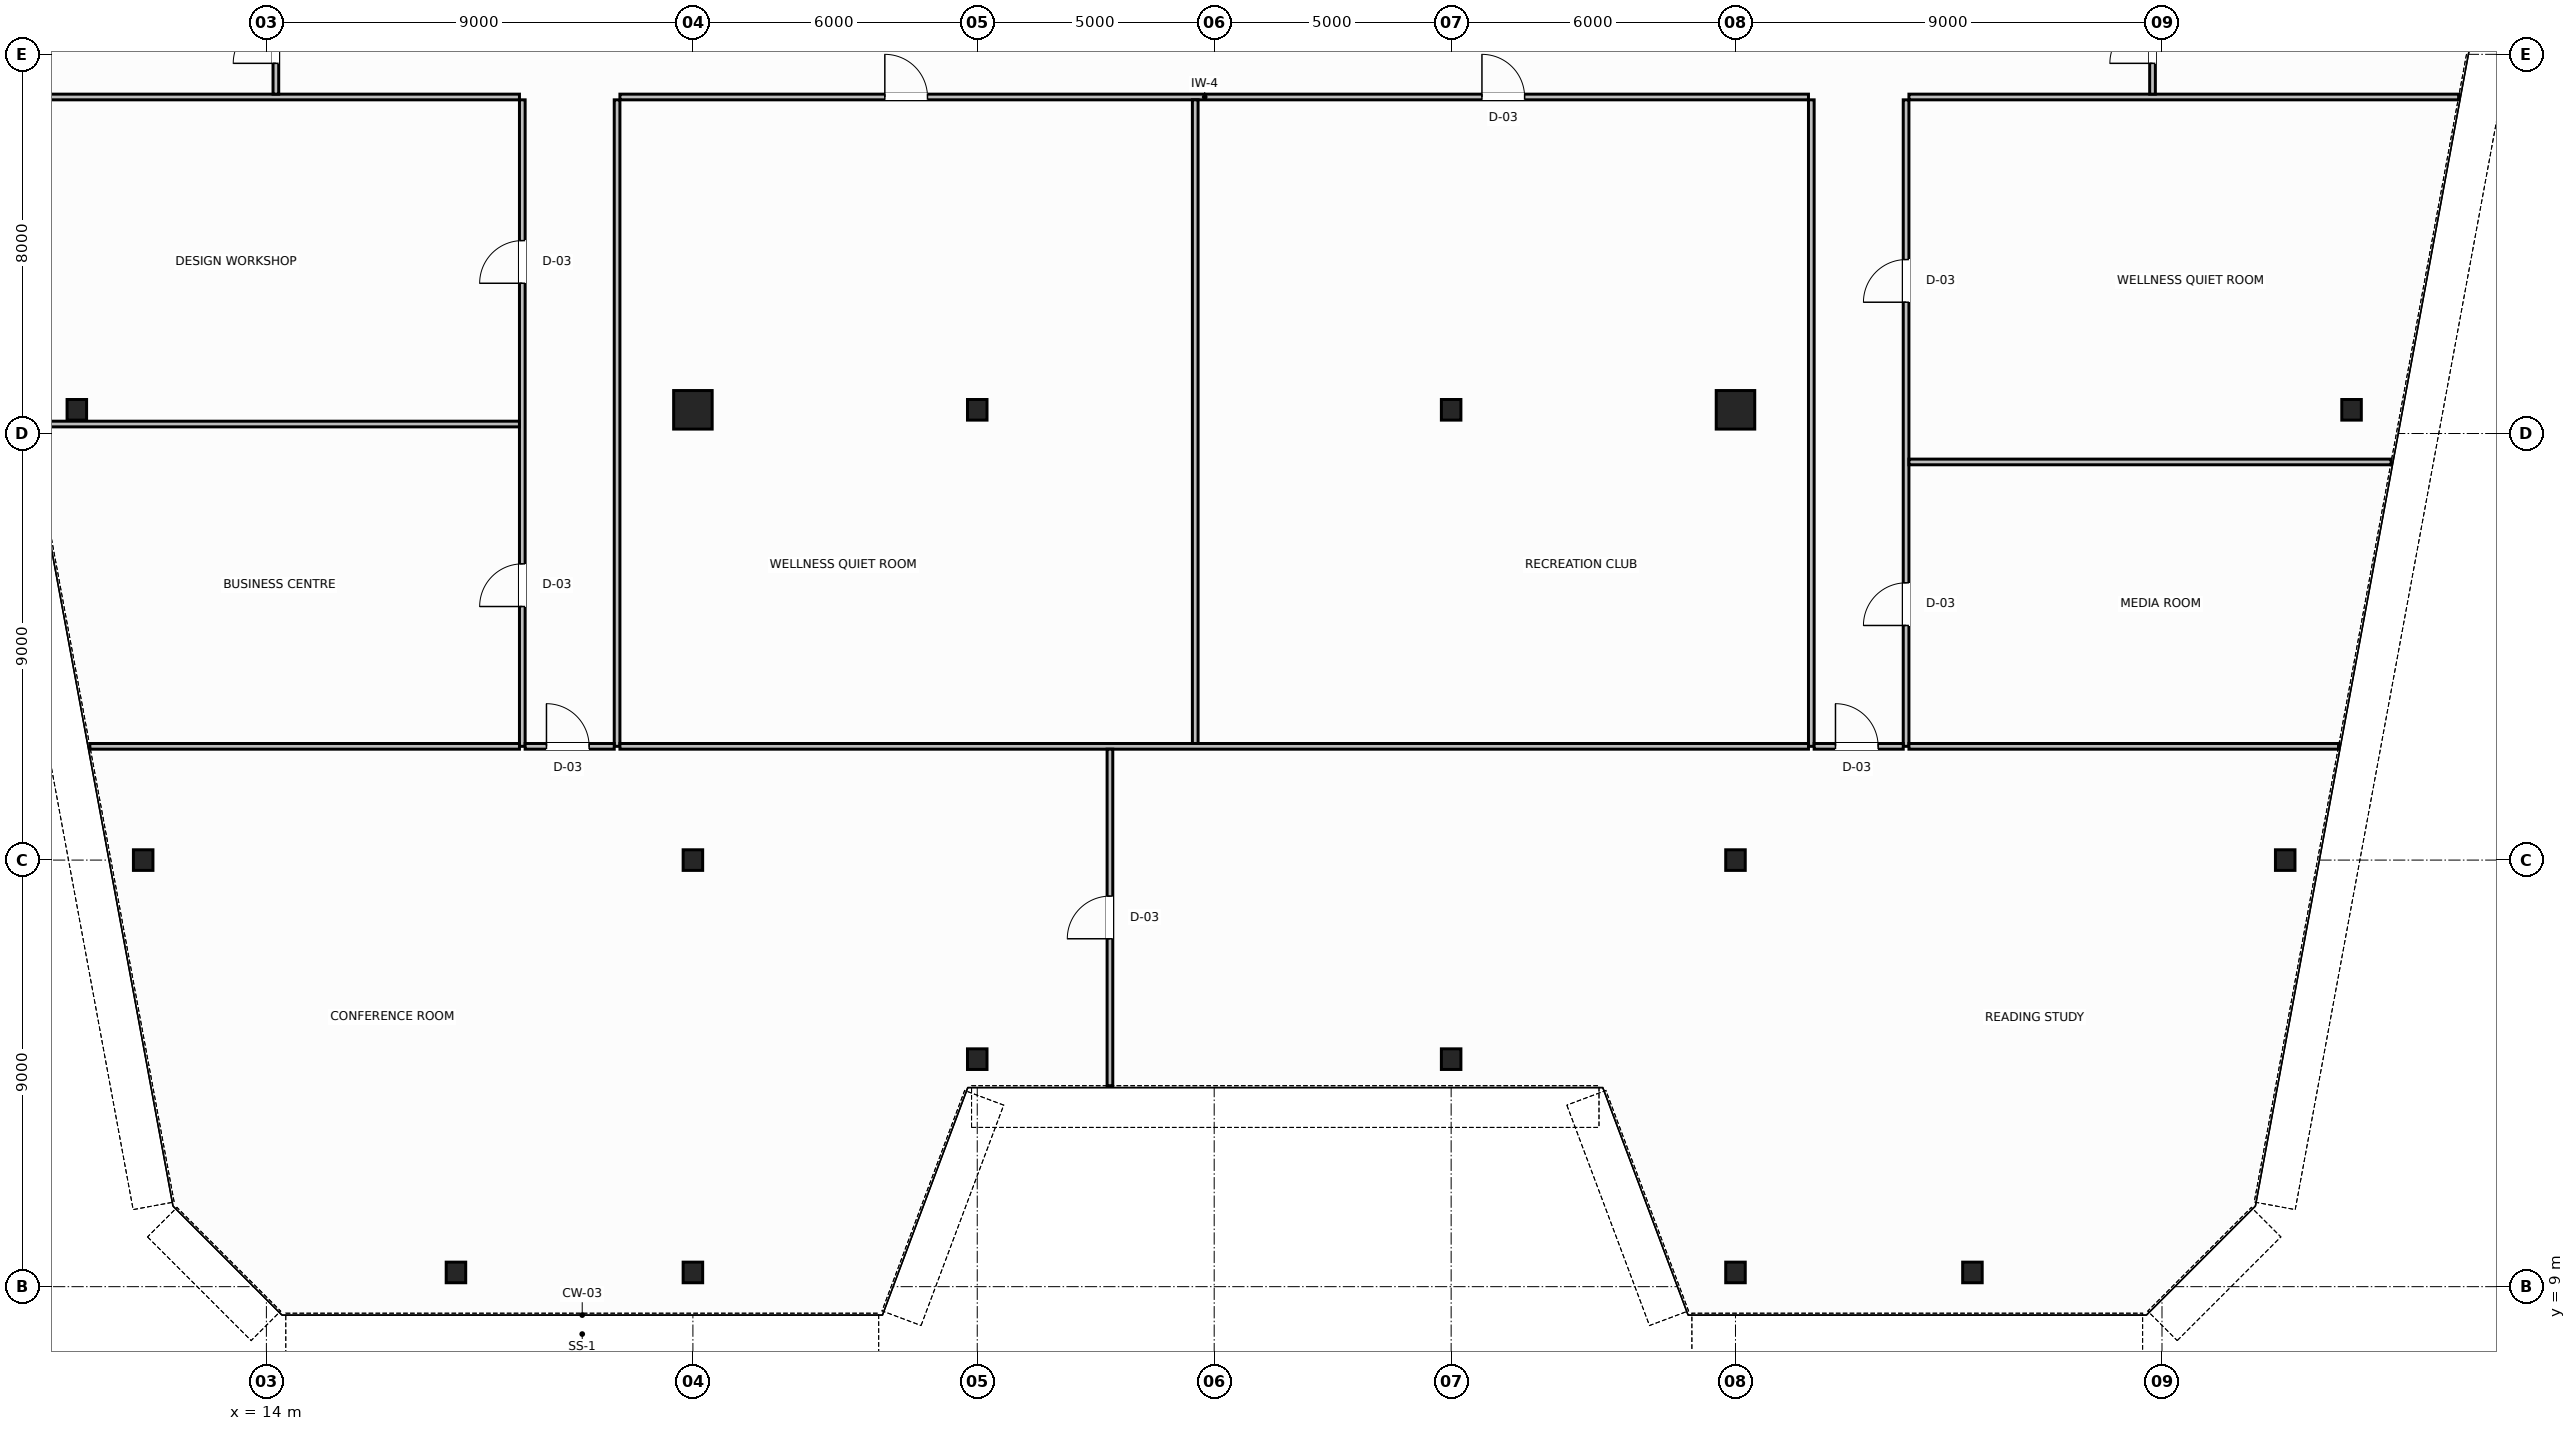
"""IFC4 building model, lengths in metres.
Left out: names, types, materials, properties, quantities, classifications, styles, units other than length and angle.
Written with IfcOpenShell. Run it as: python <this file> out.ifc"""

import sys

from ifc_helpers import new_model, si_unit, direction, frame, frame_2d, origin, origin_2d, place, context, subcontext, project, spatial, rectangle, hollow_circle, i_section, extrude, source, transform, mapped, element, fill, save


model = new_model("IFC4")
c1 = context("Model", 3, precision=1e-05, world=origin(), true_north=direction((0.0, 1.0)))
c2 = subcontext(c1, "Body", "Model", "MODEL_VIEW")
j1 = project(units=[si_unit("LENGTHUNIT", "METRE"), si_unit("PLANEANGLEUNIT", "RADIAN")], contexts=[c1])
p1 = place(None, origin())
s1 = spatial("IfcSite", under=j1, at=p1, CompositionType="ELEMENT")
p2 = place(p1, origin())
s2 = spatial("IfcBuilding", under=s1, at=p2, CompositionType="ELEMENT")
p3 = place(p2, frame((0.0, 0.0, 210.8)))
s3 = spatial("IfcBuildingStorey", under=s2, at=p3, CompositionType="ELEMENT", Elevation=210.8)
m1 = source(origin(), c2, "Body", "SweptSolid", [
    extrude(i_section(OverallWidth=0.412, OverallDepth=0.435, WebThickness=0.036, FlangeThickness=0.05, FilletRadius=0.015, at=origin_2d()), origin(), (0.0, 0.0, 1.0), 3.8),
])
for number, where, z_axis, x_axis in (
    (1, (10.0, 27.5, 0.0), (0.0, 0.0, 1.0), (1.0, 0.0, 0.0)),
    (2, (11.4, 18.0, 0.0), (0.0, 0.0, 1.0), (1.0, 0.0, 0.0)),
    (3, (58.0, 27.5, 0.0), (0.0, 0.0, 1.0), (1.0, 0.0, 0.0)),
    (4, (56.6, 18.0, 0.0), (0.0, 0.0, 1.0), (1.0, 0.0, 0.0)),
):
    element("IfcColumn", number, at=place(p3, frame(where, z_axis=z_axis, x_axis=x_axis)), inside=s3, PredefinedType="COLUMN", context=c2, shape_type="MappedRepresentation", body=[
        mapped(m1, transform((0.0, 0.0, 0.0), scale=1.0)),
    ])
m2 = source(origin(), c2, "Body", "SweptSolid", [
    extrude(hollow_circle(Radius=0.406, WallThickness=0.04, at=origin_2d()), origin(), (0.0, 0.0, 1.0), 3.8),
])
p4 = place(p3, frame((23.0, 27.5, 0.0), z_axis=(0.0, 0.0, 1.0), x_axis=(1.0, 0.0, 0.0)))
e5 = element("IfcColumn", 5, at=p4, inside=s3, PredefinedType="COLUMN", context=c2, shape_type="MappedRepresentation", body=[
    mapped(m2, transform((0.0, 0.0, 0.0), scale=1.0)),
])
m3 = source(origin(), c2, "Body", "SweptSolid", [
    extrude(i_section(OverallWidth=0.412, OverallDepth=0.435, WebThickness=0.036, FlangeThickness=0.05, FilletRadius=0.015, at=origin_2d()), origin(), (0.0, 0.0, 1.0), 3.8),
])
for number, where, z_axis, x_axis in (
    (6, (29.0, 27.5, 0.0), (0.0, 0.0, 1.0), (1.0, 0.0, 0.0)),
    (7, (39.0, 27.5, 0.0), (0.0, 0.0, 1.0), (1.0, 0.0, 0.0)),
):
    element("IfcColumn", number, at=place(p3, frame(where, z_axis=z_axis, x_axis=x_axis)), inside=s3, PredefinedType="COLUMN", context=c2, shape_type="MappedRepresentation", body=[
        mapped(m3, transform((0.0, 0.0, 0.0), scale=1.0)),
    ])
p5 = place(p3, frame((45.0, 27.5, 0.0), z_axis=(0.0, 0.0, 1.0), x_axis=(1.0, 0.0, 0.0)))
e8 = element("IfcColumn", 8, at=p5, inside=s3, PredefinedType="COLUMN", context=c2, shape_type="MappedRepresentation", body=[
    mapped(m2, transform((0.0, 0.0, 0.0), scale=1.0)),
])
for number, where, z_axis, x_axis in (
    (9, (23.0, 18.0, 0.0), (0.0, 0.0, 1.0), (1.0, 0.0, 0.0)),
    (10, (45.0, 18.0, 0.0), (0.0, 0.0, 1.0), (1.0, 0.0, 0.0)),
    (11, (18.0, 9.3, 0.0), (0.0, 0.0, 1.0), (1.0, 0.0, 0.0)),
    (12, (23.0, 9.3, 0.0), (0.0, 0.0, 1.0), (1.0, 0.0, 0.0)),
    (13, (29.0, 13.8, 0.0), (0.0, 0.0, 1.0), (1.0, 0.0, 0.0)),
    (14, (39.0, 13.8, 0.0), (0.0, 0.0, 1.0), (1.0, 0.0, 0.0)),
    (15, (45.0, 9.3, 0.0), (0.0, 0.0, 1.0), (1.0, 0.0, 0.0)),
    (16, (50.0, 9.3, 0.0), (0.0, 0.0, 1.0), (1.0, 0.0, 0.0)),
):
    element("IfcColumn", number, at=place(p3, frame(where, z_axis=z_axis, x_axis=x_axis)), inside=s3, PredefinedType="COLUMN", context=c2, shape_type="MappedRepresentation", body=[
        mapped(m3, transform((0.0, 0.0, 0.0), scale=1.0)),
    ])
p6 = place(p3, frame((21.46, 34.1, 0.0), z_axis=(0.0, 0.0, 1.0), x_axis=(1.0, 0.0, 0.0)))
e17 = element("IfcWall", 17, at=p6, inside=s3, PredefinedType="PARTITIONING", context=c2, shape_type="SweptSolid", body=[
    extrude(rectangle(XDim=25.08, YDim=0.12, at=frame_2d((12.54, 0.0))), origin(), (0.0, 0.0, 1.0), 3.58),
])
p7 = place(p6, frame((5.59, 0.0, 0.0)))
e18 = element("IfcOpeningElement", 18, at=p7, cuts=e17, PredefinedType="OPENING", context=c2, shape_type="SweptSolid", body=[
    extrude(rectangle(XDim=0.9, YDim=2.15, at=frame_2d((0.45, 1.075))), frame((0.0, 0.07, 0.0), z_axis=(0.0, -1.0, 0.0), x_axis=(1.0, 0.0, 0.0)), (0.0, 0.0, 1.0), 0.14),
])
p8 = place(p6, frame((18.19, 0.0, 0.0)))
e19 = element("IfcOpeningElement", 19, at=p8, cuts=e17, PredefinedType="OPENING", context=c2, shape_type="SweptSolid", body=[
    extrude(rectangle(XDim=0.9, YDim=2.15, at=frame_2d((0.45, 1.075))), frame((0.0, 0.07, 0.0), z_axis=(0.0, -1.0, 0.0), x_axis=(1.0, 0.0, 0.0)), (0.0, 0.0, 1.0), 0.14),
])
for number, where, z_axis, x_axis in (
    (20, (7.74, 34.1, 0.0), (0.0, 0.0, 1.0), (1.0, 0.0, 0.0)),
    (21, (48.66, 34.1, 0.0), (0.0, 0.0, 1.0), (1.0, 0.0, 0.0)),
):
    element("IfcWall", number, at=place(p3, frame(where, z_axis=z_axis, x_axis=x_axis)), inside=s3, PredefinedType="PARTITIONING", context=c2, shape_type="SweptSolid", body=[
        extrude(rectangle(XDim=11.6, YDim=0.12, at=frame_2d((5.8, 0.0))), origin(), (0.0, 0.0, 1.0), 3.58),
    ])
p9 = place(p3, frame((14.2, 34.16, 0.0), z_axis=(0.0, 0.0, 1.0), x_axis=(0.0, 1.0, 0.0)))
e22 = element("IfcWall", 22, at=p9, inside=s3, PredefinedType="PARTITIONING", context=c2, shape_type="SweptSolid", body=[
    extrude(rectangle(XDim=2.28, YDim=0.12, at=frame_2d((1.14, 0.0))), origin(), (0.0, 0.0, 1.0), 3.58),
])
p10 = place(p9, frame((0.65, 0.0, 0.0)))
e23 = element("IfcOpeningElement", 23, at=p10, cuts=e22, PredefinedType="OPENING", context=c2, shape_type="SweptSolid", body=[
    extrude(rectangle(XDim=0.9, YDim=2.15, at=frame_2d((0.45, 1.075))), frame((0.0, 0.07, 0.0), z_axis=(0.0, -1.0, 0.0), x_axis=(1.0, 0.0, 0.0)), (0.0, 0.0, 1.0), 0.14),
])
p11 = place(p3, frame((53.8, 34.16, 0.0), z_axis=(0.0, 0.0, 1.0), x_axis=(0.0, 1.0, 0.0)))
e24 = element("IfcWall", 24, at=p11, inside=s3, PredefinedType="PARTITIONING", context=c2, shape_type="SweptSolid", body=[
    extrude(rectangle(XDim=2.28, YDim=0.12, at=frame_2d((1.14, 0.0))), origin(), (0.0, 0.0, 1.0), 3.58),
])
p12 = place(p11, frame((0.65, 0.0, 0.0)))
e25 = element("IfcOpeningElement", 25, at=p12, cuts=e24, PredefinedType="OPENING", context=c2, shape_type="SweptSolid", body=[
    extrude(rectangle(XDim=0.9, YDim=2.15, at=frame_2d((0.45, 1.075))), frame((0.0, 0.07, 0.0), z_axis=(0.0, -1.0, 0.0), x_axis=(1.0, 0.0, 0.0)), (0.0, 0.0, 1.0), 0.14),
])
p13 = place(p3, frame((19.4, 20.4, 0.0), z_axis=(0.0, 0.0, 1.0), x_axis=(0.0, 1.0, 0.0)))
e26 = element("IfcWall", 26, at=p13, inside=s3, PredefinedType="PARTITIONING", context=c2, shape_type="SweptSolid", body=[
    extrude(rectangle(XDim=13.64, YDim=0.12, at=frame_2d((6.82, 0.0))), origin(), (0.0, 0.0, 1.0), 3.58),
])
p14 = place(p13, frame((2.95, 0.0, 0.0)))
e27 = element("IfcOpeningElement", 27, at=p14, cuts=e26, PredefinedType="OPENING", context=c2, shape_type="SweptSolid", body=[
    extrude(rectangle(XDim=0.9, YDim=2.15, at=frame_2d((0.45, 1.075))), frame((0.0, 0.07, 0.0), z_axis=(0.0, -1.0, 0.0), x_axis=(1.0, 0.0, 0.0)), (0.0, 0.0, 1.0), 0.14),
])
p15 = place(p13, frame((9.77, 0.0, 0.0)))
e28 = element("IfcOpeningElement", 28, at=p15, cuts=e26, PredefinedType="OPENING", context=c2, shape_type="SweptSolid", body=[
    extrude(rectangle(XDim=0.9, YDim=2.15, at=frame_2d((0.45, 1.075))), frame((0.0, 0.07, 0.0), z_axis=(0.0, -1.0, 0.0), x_axis=(1.0, 0.0, 0.0)), (0.0, 0.0, 1.0), 0.14),
])
for number, where, z_axis, x_axis in (
    (29, (21.4, 20.4, 0.0), (0.0, 0.0, 1.0), (0.0, 1.0, 0.0)),
    (30, (46.6, 20.4, 0.0), (0.0, 0.0, 1.0), (0.0, 1.0, 0.0)),
):
    element("IfcWall", number, at=place(p3, frame(where, z_axis=z_axis, x_axis=x_axis)), inside=s3, PredefinedType="PARTITIONING", context=c2, shape_type="SweptSolid", body=[
        extrude(rectangle(XDim=13.64, YDim=0.12, at=frame_2d((6.82, 0.0))), origin(), (0.0, 0.0, 1.0), 3.58),
    ])
p16 = place(p3, frame((48.6, 20.4, 0.0), z_axis=(0.0, 0.0, 1.0), x_axis=(0.0, 1.0, 0.0)))
e31 = element("IfcWall", 31, at=p16, inside=s3, PredefinedType="PARTITIONING", context=c2, shape_type="SweptSolid", body=[
    extrude(rectangle(XDim=13.64, YDim=0.12, at=frame_2d((6.82, 0.0))), origin(), (0.0, 0.0, 1.0), 3.58),
])
p17 = place(p16, frame((2.55, 0.0, 0.0)))
e32 = element("IfcOpeningElement", 32, at=p17, cuts=e31, PredefinedType="OPENING", context=c2, shape_type="SweptSolid", body=[
    extrude(rectangle(XDim=0.9, YDim=2.15, at=frame_2d((0.45, 1.075))), frame((0.0, 0.07, 0.0), z_axis=(0.0, -1.0, 0.0), x_axis=(1.0, 0.0, 0.0)), (0.0, 0.0, 1.0), 0.14),
])
p18 = place(p16, frame((9.37, 0.0, 0.0)))
e33 = element("IfcOpeningElement", 33, at=p18, cuts=e31, PredefinedType="OPENING", context=c2, shape_type="SweptSolid", body=[
    extrude(rectangle(XDim=0.9, YDim=2.15, at=frame_2d((0.45, 1.075))), frame((0.0, 0.07, 0.0), z_axis=(0.0, -1.0, 0.0), x_axis=(1.0, 0.0, 0.0)), (0.0, 0.0, 1.0), 0.14),
])
p19 = place(p3, frame((19.46, 20.4, 0.0), z_axis=(0.0, 0.0, 1.0), x_axis=(1.0, 0.0, 0.0)))
e34 = element("IfcWall", 34, at=p19, inside=s3, PredefinedType="PARTITIONING", context=c2, shape_type="SweptSolid", body=[
    extrude(rectangle(XDim=1.88, YDim=0.12, at=frame_2d((0.94, 0.0))), origin(), (0.0, 0.0, 1.0), 3.58),
])
p20 = place(p19, frame((0.45, 0.0, 0.0)))
e35 = element("IfcOpeningElement", 35, at=p20, cuts=e34, PredefinedType="OPENING", context=c2, shape_type="SweptSolid", body=[
    extrude(rectangle(XDim=0.9, YDim=2.15, at=frame_2d((0.45, 1.075))), frame((0.0, 0.07, 0.0), z_axis=(0.0, -1.0, 0.0), x_axis=(1.0, 0.0, 0.0)), (0.0, 0.0, 1.0), 0.14),
])
p21 = place(p3, frame((46.66, 20.4, 0.0), z_axis=(0.0, 0.0, 1.0), x_axis=(1.0, 0.0, 0.0)))
e36 = element("IfcWall", 36, at=p21, inside=s3, PredefinedType="PARTITIONING", context=c2, shape_type="SweptSolid", body=[
    extrude(rectangle(XDim=1.88, YDim=0.12, at=frame_2d((0.94, 0.0))), origin(), (0.0, 0.0, 1.0), 3.58),
])
p22 = place(p21, frame((0.45, 0.0, 0.0)))
e37 = element("IfcOpeningElement", 37, at=p22, cuts=e36, PredefinedType="OPENING", context=c2, shape_type="SweptSolid", body=[
    extrude(rectangle(XDim=0.9, YDim=2.15, at=frame_2d((0.45, 1.075))), frame((0.0, 0.07, 0.0), z_axis=(0.0, -1.0, 0.0), x_axis=(1.0, 0.0, 0.0)), (0.0, 0.0, 1.0), 0.14),
])
p23 = place(p3, frame((10.275, 20.4, 0.0), z_axis=(0.0, 0.0, 1.0), x_axis=(1.0, 0.0, 0.0)))
e38 = element("IfcWall", 38, at=p23, inside=s3, PredefinedType="PARTITIONING", context=c2, shape_type="SweptSolid", body=[
    extrude(rectangle(XDim=9.065, YDim=0.12, at=frame_2d((4.533, 0.0))), origin(), (0.0, 0.0, 1.0), 3.58),
])
p24 = place(p3, frame((9.017, 27.2, 0.0), z_axis=(0.0, 0.0, 1.0), x_axis=(1.0, 0.0, 0.0)))
e39 = element("IfcWall", 39, at=p24, inside=s3, PredefinedType="PARTITIONING", context=c2, shape_type="SweptSolid", body=[
    extrude(rectangle(XDim=10.323, YDim=0.12, at=frame_2d((5.162, 0.0))), origin(), (0.0, 0.0, 1.0), 3.58),
])
p25 = place(p3, frame((48.66, 20.4, 0.0), z_axis=(0.0, 0.0, 1.0), x_axis=(1.0, 0.0, 0.0)))
e40 = element("IfcWall", 40, at=p25, inside=s3, PredefinedType="PARTITIONING", context=c2, shape_type="SweptSolid", body=[
    extrude(rectangle(XDim=9.065, YDim=0.12, at=frame_2d((4.533, 0.0))), origin(), (0.0, 0.0, 1.0), 3.58),
])
p26 = place(p3, frame((48.66, 26.4, 0.0), z_axis=(0.0, 0.0, 1.0), x_axis=(1.0, 0.0, 0.0)))
e41 = element("IfcWall", 41, at=p26, inside=s3, PredefinedType="PARTITIONING", context=c2, shape_type="SweptSolid", body=[
    extrude(rectangle(XDim=10.175, YDim=0.12, at=frame_2d((5.088, 0.0))), origin(), (0.0, 0.0, 1.0), 3.58),
])
p27 = place(p3, frame((21.46, 20.4, 0.0), z_axis=(0.0, 0.0, 1.0), x_axis=(1.0, 0.0, 0.0)))
e42 = element("IfcWall", 42, at=p27, inside=s3, PredefinedType="PARTITIONING", context=c2, shape_type="SweptSolid", body=[
    extrude(rectangle(XDim=25.08, YDim=0.12, at=frame_2d((12.54, 0.0))), origin(), (0.0, 0.0, 1.0), 3.58),
])
p28 = place(p3, frame((33.6, 20.46, 0.0), z_axis=(0.0, 0.0, 1.0), x_axis=(0.0, 1.0, 0.0)))
e43 = element("IfcWall", 43, at=p28, inside=s3, PredefinedType="PARTITIONING", context=c2, shape_type="SweptSolid", body=[
    extrude(rectangle(XDim=13.58, YDim=0.12, at=frame_2d((6.79, 0.0))), origin(), (0.0, 0.0, 1.0), 3.58),
])
p29 = place(p3, frame((31.8, 13.24, 0.0), z_axis=(0.0, 0.0, 1.0), x_axis=(0.0, 1.0, 0.0)))
e44 = element("IfcWall", 44, at=p29, inside=s3, PredefinedType="PARTITIONING", context=c2, shape_type="SweptSolid", body=[
    extrude(rectangle(XDim=7.1, YDim=0.12, at=frame_2d((3.55, 0.0))), origin(), (0.0, 0.0, 1.0), 3.58),
])
p30 = place(p29, frame((3.1, 0.0, 0.0)))
e45 = element("IfcOpeningElement", 45, at=p30, cuts=e44, PredefinedType="OPENING", context=c2, shape_type="SweptSolid", body=[
    extrude(rectangle(XDim=0.9, YDim=2.15, at=frame_2d((0.45, 1.075))), frame((0.0, 0.07, 0.0), z_axis=(0.0, -1.0, 0.0), x_axis=(1.0, 0.0, 0.0)), (0.0, 0.0, 1.0), 0.14),
])
m4 = source(origin(), c2, "Body", "SweptSolid", [
    extrude(rectangle(XDim=0.9, YDim=2.15, at=frame_2d((0.45, 1.075))), frame((0.0, 0.025, 0.0), z_axis=(0.0, -1.0, 0.0), x_axis=(1.0, 0.0, 0.0)), (0.0, 0.0, 1.0), 0.05),
])
p31 = place(p10, origin())
e46 = element("IfcDoor", 46, at=p31, inside=s3, OperationType="SINGLE_SWING_LEFT", PredefinedType="DOOR", context=c2, shape_type="MappedRepresentation", body=[
    mapped(m4, transform((0.0, 0.0, 0.0), scale=1.0)),
])
fill(e23, e46)
p32 = place(p12, origin())
e47 = element("IfcDoor", 47, at=p32, inside=s3, OperationType="SINGLE_SWING_RIGHT", PredefinedType="DOOR", context=c2, shape_type="MappedRepresentation", body=[
    mapped(m4, transform((0.0, 0.0, 0.0), scale=1.0)),
])
fill(e25, e47)
p33 = place(p14, origin())
e48 = element("IfcDoor", 48, at=p33, inside=s3, OperationType="SINGLE_SWING_LEFT", PredefinedType="DOOR", context=c2, shape_type="MappedRepresentation", body=[
    mapped(m4, transform((0.0, 0.0, 0.0), scale=1.0)),
])
fill(e27, e48)
p34 = place(p15, origin())
e49 = element("IfcDoor", 49, at=p34, inside=s3, OperationType="SINGLE_SWING_RIGHT", PredefinedType="DOOR", context=c2, shape_type="MappedRepresentation", body=[
    mapped(m4, transform((0.0, 0.0, 0.0), scale=1.0)),
])
fill(e28, e49)
p35 = place(p17, origin())
e50 = element("IfcDoor", 50, at=p35, inside=s3, OperationType="SINGLE_SWING_RIGHT", PredefinedType="DOOR", context=c2, shape_type="MappedRepresentation", body=[
    mapped(m4, transform((0.0, 0.0, 0.0), scale=1.0)),
])
fill(e32, e50)
p36 = place(p18, origin())
e51 = element("IfcDoor", 51, at=p36, inside=s3, OperationType="SINGLE_SWING_LEFT", PredefinedType="DOOR", context=c2, shape_type="MappedRepresentation", body=[
    mapped(m4, transform((0.0, 0.0, 0.0), scale=1.0)),
])
fill(e33, e51)
p37 = place(p7, origin())
e52 = element("IfcDoor", 52, at=p37, inside=s3, OperationType="SINGLE_SWING_LEFT", PredefinedType="DOOR", context=c2, shape_type="MappedRepresentation", body=[
    mapped(m4, transform((0.0, 0.0, 0.0), scale=1.0)),
])
fill(e18, e52)
p38 = place(p8, origin())
e53 = element("IfcDoor", 53, at=p38, inside=s3, OperationType="SINGLE_SWING_RIGHT", PredefinedType="DOOR", context=c2, shape_type="MappedRepresentation", body=[
    mapped(m4, transform((0.0, 0.0, 0.0), scale=1.0)),
])
fill(e19, e53)
p39 = place(p20, origin())
e54 = element("IfcDoor", 54, at=p39, inside=s3, OperationType="SINGLE_SWING_LEFT", PredefinedType="DOOR", context=c2, shape_type="MappedRepresentation", body=[
    mapped(m4, transform((0.0, 0.0, 0.0), scale=1.0)),
])
fill(e35, e54)
p40 = place(p30, origin())
e55 = element("IfcDoor", 55, at=p40, inside=s3, OperationType="SINGLE_SWING_RIGHT", PredefinedType="DOOR", context=c2, shape_type="MappedRepresentation", body=[
    mapped(m4, transform((0.0, 0.0, 0.0), scale=1.0)),
])
fill(e45, e55)
p41 = place(p22, origin())
e56 = element("IfcDoor", 56, at=p41, inside=s3, OperationType="SINGLE_SWING_RIGHT", PredefinedType="DOOR", context=c2, shape_type="MappedRepresentation", body=[
    mapped(m4, transform((0.0, 0.0, 0.0), scale=1.0)),
])
fill(e37, e56)
save(model, sys.argv[1])
